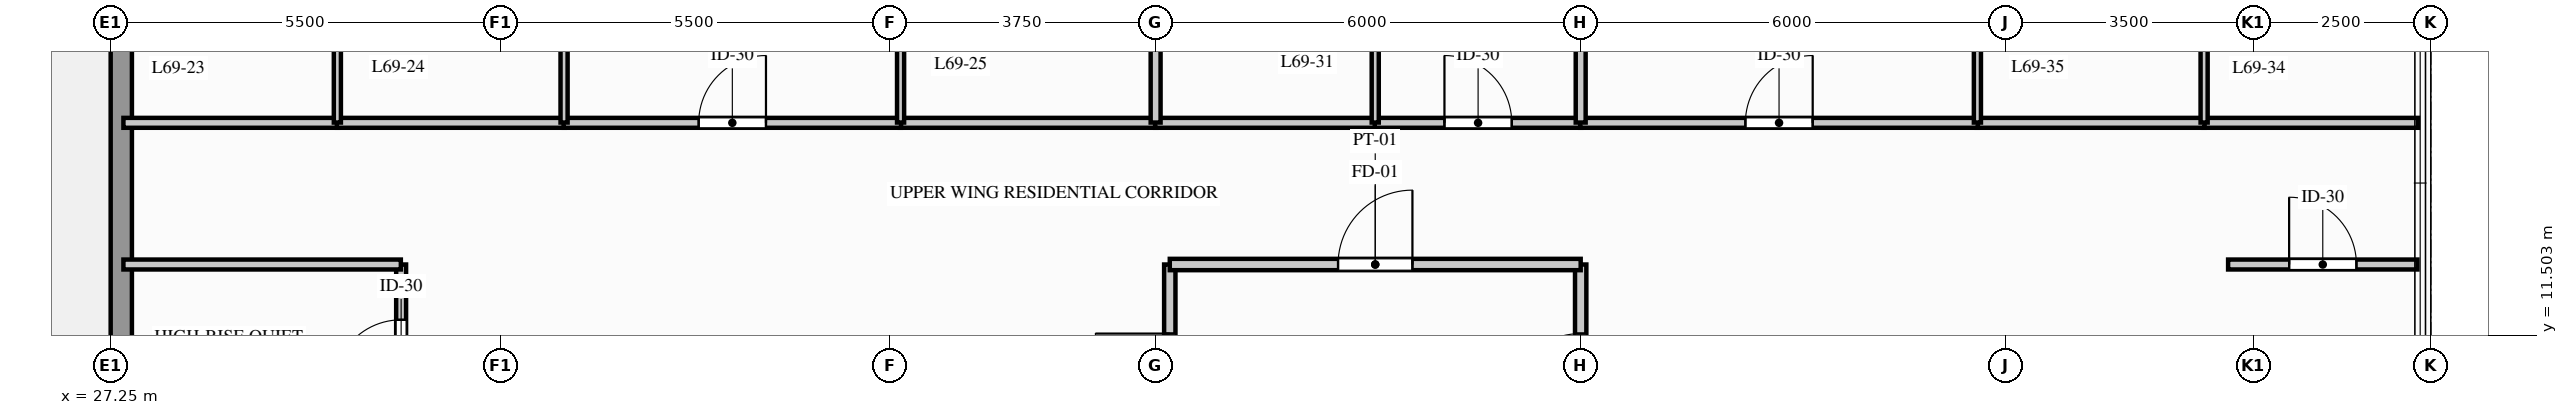
"""IFC4 building model, lengths in metres.
Left out: names, types, materials, properties, quantities, classifications, styles, units other than length and angle.
Written with IfcOpenShell. Run it as: python <this file> out.ifc"""

import sys

from ifc_helpers import new_model, si_unit, direction, frame, frame_2d, origin, place, context, subcontext, project, spatial, rectangle, extrude, element, fill, save


model = new_model("IFC4")
c1 = context("Model", 3, precision=1e-05, world=origin(), true_north=direction((0.0, 1.0)))
c2 = subcontext(c1, "Body", "Model", "MODEL_VIEW")
j1 = project(units=[si_unit("LENGTHUNIT", "METRE"), si_unit("PLANEANGLEUNIT", "RADIAN")], contexts=[c1])
p1 = place(None, origin())
s1 = spatial("IfcSite", under=j1, at=p1, CompositionType="ELEMENT")
p2 = place(p1, origin())
s2 = spatial("IfcBuilding", under=s1, at=p2, CompositionType="ELEMENT")
p3 = place(p2, frame((0.0, 0.0, 227.3)))
s3 = spatial("IfcBuildingStorey", under=s2, at=p3, CompositionType="ELEMENT", Elevation=227.3)
p4 = place(p3, frame((27.4, 24.0, 0.0), z_axis=(0.0, 0.0, 1.0), x_axis=(0.0, -1.0, 0.0)))
e1 = element("IfcWall", 1, at=p4, inside=s3, PredefinedType="STANDARD", context=c2, shape_type="SweptSolid", body=[
    extrude(rectangle(XDim=21.5, YDim=0.3, at=frame_2d((10.75, 0.0))), origin(), (0.0, 0.0, 1.0), 2.332),
])
p5 = place(p4, frame((5.5, 0.0, 0.0)))
e2 = element("IfcOpeningElement", 2, at=p5, cuts=e1, PredefinedType="OPENING", context=c2, shape_type="SweptSolid", body=[
    extrude(rectangle(XDim=1.1, YDim=2.2, at=frame_2d((0.55, 1.1))), frame((0.0, 0.16, 0.0), z_axis=(0.0, -1.0, 0.0), x_axis=(1.0, 0.0, 0.0)), (0.0, 0.0, 1.0), 0.32),
])
p6 = place(p4, frame((2.43, 0.0, 0.312)))
e3 = element("IfcOpeningElement", 3, at=p6, cuts=e1, PredefinedType="OPENING", context=c2, shape_type="SweptSolid", body=[
    extrude(rectangle(XDim=1.5, YDim=1.8, at=frame_2d((0.75, 0.9))), frame((0.0, 0.16, 0.0), z_axis=(0.0, -1.0, 0.0), x_axis=(1.0, 0.0, 0.0)), (0.0, 0.0, 1.0), 0.32),
])
p7 = place(p3, frame((31.35, 9.989, 0.0), z_axis=(0.0, 0.0, 1.0), x_axis=(0.0, 1.0, 0.0)))
e4 = element("IfcWall", 4, at=p7, inside=s3, PredefinedType="PARTITIONING", context=c2, shape_type="SweptSolid", body=[
    extrude(rectangle(XDim=2.511, YDim=0.14, at=frame_2d((1.256, 0.0))), origin(), (0.0, 0.0, 1.0), 2.325),
])
p8 = place(p7, frame((0.781, 0.0, 0.0)))
e5 = element("IfcOpeningElement", 5, at=p8, cuts=e4, PredefinedType="OPENING", context=c2, shape_type="SweptSolid", body=[
    extrude(rectangle(XDim=0.95, YDim=2.05, at=frame_2d((0.475, 1.025))), frame((0.0, 0.08, 0.0), z_axis=(0.0, -1.0, 0.0), x_axis=(1.0, 0.0, 0.0)), (0.0, 0.0, 1.0), 0.16),
])
p9 = place(p3, frame((42.2, 9.5, 0.0), z_axis=(0.0, 0.0, 1.0), x_axis=(0.0, 1.0, 0.0)))
e6 = element("IfcWall", 6, at=p9, inside=s3, PredefinedType="PARTITIONING", context=c2, shape_type="SweptSolid", body=[
    extrude(rectangle(XDim=3.0, YDim=0.16, at=frame_2d((1.5, 0.0))), origin(), (0.0, 0.0, 1.0), 2.325),
])
p10 = place(p9, frame((0.975, 0.0, 0.0)))
e7 = element("IfcOpeningElement", 7, at=p10, cuts=e6, PredefinedType="OPENING", context=c2, shape_type="SweptSolid", body=[
    extrude(rectangle(XDim=1.05, YDim=2.06, at=frame_2d((0.525, 1.03))), frame((0.0, 0.09, 0.0), z_axis=(0.0, -1.0, 0.0), x_axis=(1.0, 0.0, 0.0)), (0.0, 0.0, 1.0), 0.18),
])
p11 = place(p3, frame((48.0, 9.5, 0.0), z_axis=(0.0, 0.0, 1.0), x_axis=(0.0, 1.0, 0.0)))
e8 = element("IfcWall", 8, at=p11, inside=s3, PredefinedType="PARTITIONING", context=c2, shape_type="SweptSolid", body=[
    extrude(rectangle(XDim=3.0, YDim=0.16, at=frame_2d((1.5, 0.0))), origin(), (0.0, 0.0, 1.0), 2.325),
])
p12 = place(p11, frame((0.975, 0.0, 0.0)))
e9 = element("IfcOpeningElement", 9, at=p12, cuts=e8, PredefinedType="OPENING", context=c2, shape_type="SweptSolid", body=[
    extrude(rectangle(XDim=1.05, YDim=2.06, at=frame_2d((0.525, 1.03))), frame((0.0, 0.09, 0.0), z_axis=(0.0, -1.0, 0.0), x_axis=(1.0, 0.0, 0.0)), (0.0, 0.0, 1.0), 0.18),
])
p13 = place(p3, frame((42.2, 12.5, 0.0), z_axis=(0.0, 0.0, 1.0), x_axis=(1.0, 0.0, 0.0)))
e10 = element("IfcWall", 10, at=p13, inside=s3, PredefinedType="PARTITIONING", context=c2, shape_type="SweptSolid", body=[
    extrude(rectangle(XDim=5.8, YDim=0.16, at=frame_2d((2.9, 0.0))), origin(), (0.0, 0.0, 1.0), 2.325),
])
p14 = place(p13, frame((2.375, 0.0, 0.0)))
e11 = element("IfcOpeningElement", 11, at=p14, cuts=e10, PredefinedType="OPENING", context=c2, shape_type="SweptSolid", body=[
    extrude(rectangle(XDim=1.05, YDim=2.06, at=frame_2d((0.525, 1.03))), frame((0.0, 0.09, 0.0), z_axis=(0.0, -1.0, 0.0), x_axis=(1.0, 0.0, 0.0)), (0.0, 0.0, 1.0), 0.18),
])
p15 = place(p3, frame((57.139, 12.5, 0.0), z_axis=(0.0, 0.0, 1.0), x_axis=(1.0, 0.0, 0.0)))
e12 = element("IfcWall", 12, at=p15, inside=s3, PredefinedType="PARTITIONING", context=c2, shape_type="SweptSolid", body=[
    extrude(rectangle(XDim=2.673, YDim=0.14, at=frame_2d((1.336, 0.0))), origin(), (0.0, 0.0, 1.0), 2.89),
])
p16 = place(p15, frame((0.861, 0.0, 0.0)))
e13 = element("IfcOpeningElement", 13, at=p16, cuts=e12, PredefinedType="OPENING", context=c2, shape_type="SweptSolid", body=[
    extrude(rectangle(XDim=0.95, YDim=2.05, at=frame_2d((0.475, 1.025))), frame((0.0, 0.08, 0.0), z_axis=(0.0, -1.0, 0.0), x_axis=(1.0, 0.0, 0.0)), (0.0, 0.0, 1.0), 0.16),
])
p17 = place(p3, frame((27.43, 12.5, 0.0), z_axis=(0.0, 0.0, 1.0), x_axis=(1.0, 0.0, 0.0)))
e14 = element("IfcWall", 14, at=p17, inside=s3, PredefinedType="PARTITIONING", context=c2, shape_type="SweptSolid", body=[
    extrude(rectangle(XDim=3.916, YDim=0.14, at=frame_2d((1.958, 0.0))), origin(), (0.0, 0.0, 1.0), 2.89),
])
p18 = place(p3, frame((27.43, 14.5, 0.0), z_axis=(0.0, 0.0, 1.0), x_axis=(1.0, 0.0, 0.0)))
e15 = element("IfcWall", 15, at=p18, inside=s3, PredefinedType="PARTITIONING", context=c2, shape_type="SweptSolid", body=[
    extrude(rectangle(XDim=3.031, YDim=0.14, at=frame_2d((1.516, 0.0))), origin(), (0.0, 0.0, 1.0), 2.89),
])
p19 = place(p3, frame((30.443, 14.5, 0.0), z_axis=(0.0, 0.0, 1.0), x_axis=(1.0, 0.0, 0.0)))
e16 = element("IfcWall", 16, at=p19, inside=s3, PredefinedType="PARTITIONING", context=c2, shape_type="SweptSolid", body=[
    extrude(rectangle(XDim=3.219, YDim=0.14, at=frame_2d((1.609, 0.0))), origin(), (0.0, 0.0, 1.0), 2.89),
])
p20 = place(p3, frame((38.389, 14.5, 0.0), z_axis=(0.0, 0.0, 1.0), x_axis=(1.0, 0.0, 0.0)))
e17 = element("IfcWall", 17, at=p20, inside=s3, PredefinedType="PARTITIONING", context=c2, shape_type="SweptSolid", body=[
    extrude(rectangle(XDim=3.623, YDim=0.14, at=frame_2d((1.811, 0.0))), origin(), (0.0, 0.0, 1.0), 2.325),
])
p21 = place(p3, frame((33.643, 14.5, 0.0), z_axis=(0.0, 0.0, 1.0), x_axis=(1.0, 0.0, 0.0)))
e18 = element("IfcWall", 18, at=p21, inside=s3, PredefinedType="PARTITIONING", context=c2, shape_type="SweptSolid", body=[
    extrude(rectangle(XDim=4.765, YDim=0.14, at=frame_2d((2.382, 0.0))), origin(), (0.0, 0.0, 1.0), 2.325),
])
p22 = place(p21, frame((1.907, 0.0, 0.0)))
e19 = element("IfcOpeningElement", 19, at=p22, cuts=e18, PredefinedType="OPENING", context=c2, shape_type="SweptSolid", body=[
    extrude(rectangle(XDim=0.95, YDim=2.05, at=frame_2d((0.475, 1.025))), frame((0.0, 0.08, 0.0), z_axis=(0.0, -1.0, 0.0), x_axis=(1.0, 0.0, 0.0)), (0.0, 0.0, 1.0), 0.16),
])
p23 = place(p3, frame((41.993, 14.5, 0.0), z_axis=(0.0, 0.0, 1.0), x_axis=(1.0, 0.0, 0.0)))
e20 = element("IfcWall", 20, at=p23, inside=s3, PredefinedType="PARTITIONING", context=c2, shape_type="SweptSolid", body=[
    extrude(rectangle(XDim=3.119, YDim=0.14, at=frame_2d((1.559, 0.0))), origin(), (0.0, 0.0, 1.0), 2.325),
])
p24 = place(p3, frame((45.093, 14.5, 0.0), z_axis=(0.0, 0.0, 1.0), x_axis=(1.0, 0.0, 0.0)))
e21 = element("IfcWall", 21, at=p24, inside=s3, PredefinedType="PARTITIONING", context=c2, shape_type="SweptSolid", body=[
    extrude(rectangle(XDim=2.918, YDim=0.14, at=frame_2d((1.459, 0.0))), origin(), (0.0, 0.0, 1.0), 2.325),
])
p25 = place(p24, frame((0.984, 0.0, 0.0)))
e22 = element("IfcOpeningElement", 22, at=p25, cuts=e21, PredefinedType="OPENING", context=c2, shape_type="SweptSolid", body=[
    extrude(rectangle(XDim=0.95, YDim=2.05, at=frame_2d((0.475, 1.025))), frame((0.0, 0.08, 0.0), z_axis=(0.0, -1.0, 0.0), x_axis=(1.0, 0.0, 0.0)), (0.0, 0.0, 1.0), 0.16),
])
p26 = place(p3, frame((56.789, 14.5, 0.0), z_axis=(0.0, 0.0, 1.0), x_axis=(1.0, 0.0, 0.0)))
e23 = element("IfcWall", 23, at=p26, inside=s3, PredefinedType="PARTITIONING", context=c2, shape_type="SweptSolid", body=[
    extrude(rectangle(XDim=3.031, YDim=0.14, at=frame_2d((1.516, 0.0))), origin(), (0.0, 0.0, 1.0), 2.89),
])
p27 = place(p3, frame((53.589, 14.5, 0.0), z_axis=(0.0, 0.0, 1.0), x_axis=(1.0, 0.0, 0.0)))
e24 = element("IfcWall", 24, at=p27, inside=s3, PredefinedType="PARTITIONING", context=c2, shape_type="SweptSolid", body=[
    extrude(rectangle(XDim=3.219, YDim=0.14, at=frame_2d((1.609, 0.0))), origin(), (0.0, 0.0, 1.0), 2.325),
])
p28 = place(p3, frame((47.993, 14.5, 0.0), z_axis=(0.0, 0.0, 1.0), x_axis=(1.0, 0.0, 0.0)))
e25 = element("IfcWall", 25, at=p28, inside=s3, PredefinedType="PARTITIONING", context=c2, shape_type="SweptSolid", body=[
    extrude(rectangle(XDim=5.615, YDim=0.14, at=frame_2d((2.807, 0.0))), origin(), (0.0, 0.0, 1.0), 2.325),
])
p29 = place(p28, frame((2.332, 0.0, 0.0)))
e26 = element("IfcOpeningElement", 26, at=p29, cuts=e25, PredefinedType="OPENING", context=c2, shape_type="SweptSolid", body=[
    extrude(rectangle(XDim=0.95, YDim=2.05, at=frame_2d((0.475, 1.025))), frame((0.0, 0.08, 0.0), z_axis=(0.0, -1.0, 0.0), x_axis=(1.0, 0.0, 0.0)), (0.0, 0.0, 1.0), 0.16),
])
for number, where, z_axis, x_axis in (
    (27, (30.45, 14.504, 0.0), (0.0, 0.0, 1.0), (0.0, 1.0, 0.0)),
    (28, (33.65, 14.504, 0.0), (0.0, 0.0, 1.0), (0.0, 1.0, 0.0)),
    (29, (38.4, 14.504, 0.0), (0.0, 0.0, 1.0), (0.0, 1.0, 0.0)),
):
    element("IfcWall", number, at=place(p3, frame(where, z_axis=z_axis, x_axis=x_axis)), inside=s3, PredefinedType="PARTITIONING", context=c2, shape_type="SweptSolid", body=[
        extrude(rectangle(XDim=2.346, YDim=0.1, at=frame_2d((1.173, 0.0))), origin(), (0.0, 0.0, 1.0), 2.325),
    ])
p30 = place(p3, frame((42.0, 14.504, 0.0), z_axis=(0.0, 0.0, 1.0), x_axis=(0.0, 1.0, 0.0)))
e30 = element("IfcWall", 30, at=p30, inside=s3, PredefinedType="PARTITIONING", context=c2, shape_type="SweptSolid", body=[
    extrude(rectangle(XDim=2.346, YDim=0.14, at=frame_2d((1.173, 0.0))), origin(), (0.0, 0.0, 1.0), 2.325),
])
p31 = place(p3, frame((45.1, 14.504, 0.0), z_axis=(0.0, 0.0, 1.0), x_axis=(0.0, 1.0, 0.0)))
e31 = element("IfcWall", 31, at=p31, inside=s3, PredefinedType="PARTITIONING", context=c2, shape_type="SweptSolid", body=[
    extrude(rectangle(XDim=2.546, YDim=0.1, at=frame_2d((1.273, 0.0))), origin(), (0.0, 0.0, 1.0), 2.325),
])
p32 = place(p3, frame((48.0, 14.504, 0.0), z_axis=(0.0, 0.0, 1.0), x_axis=(0.0, 1.0, 0.0)))
e32 = element("IfcWall", 32, at=p32, inside=s3, PredefinedType="PARTITIONING", context=c2, shape_type="SweptSolid", body=[
    extrude(rectangle(XDim=7.253, YDim=0.14, at=frame_2d((3.627, 0.0))), origin(), (0.0, 0.0, 1.0), 2.325),
])
for number, where, z_axis, x_axis in (
    (33, (56.8, 14.504, 0.0), (0.0, 0.0, 1.0), (0.0, 1.0, 0.0)),
    (34, (53.6, 14.504, 0.0), (0.0, 0.0, 1.0), (0.0, 1.0, 0.0)),
):
    element("IfcWall", number, at=place(p3, frame(where, z_axis=z_axis, x_axis=x_axis)), inside=s3, PredefinedType="PARTITIONING", context=c2, shape_type="SweptSolid", body=[
        extrude(rectangle(XDim=2.346, YDim=0.1, at=frame_2d((1.173, 0.0))), origin(), (0.0, 0.0, 1.0), 2.325),
    ])
p33 = place(p8, origin())
e35 = element("IfcDoor", 35, at=p33, inside=s3, OperationType="SINGLE_SWING_LEFT", PredefinedType="DOOR", context=c2, shape_type="SweptSolid", body=[
    extrude(rectangle(XDim=0.95, YDim=2.05, at=frame_2d((0.475, 1.025))), frame((0.0, 0.025, 0.0), z_axis=(0.0, -1.0, 0.0), x_axis=(1.0, 0.0, 0.0)), (0.0, 0.0, 1.0), 0.05),
])
fill(e5, e35)
p34 = place(p10, origin())
e36 = element("IfcDoor", 36, at=p34, inside=s3, OperationType="SINGLE_SWING_RIGHT", PredefinedType="DOOR", context=c2, shape_type="SweptSolid", body=[
    extrude(rectangle(XDim=1.05, YDim=2.06, at=frame_2d((0.525, 1.03))), frame((0.0, 0.025, 0.0), z_axis=(0.0, -1.0, 0.0), x_axis=(1.0, 0.0, 0.0)), (0.0, 0.0, 1.0), 0.05),
])
fill(e7, e36)
p35 = place(p12, origin())
e37 = element("IfcDoor", 37, at=p35, inside=s3, OperationType="SINGLE_SWING_LEFT", PredefinedType="DOOR", context=c2, shape_type="SweptSolid", body=[
    extrude(rectangle(XDim=1.05, YDim=2.06, at=frame_2d((0.525, 1.03))), frame((0.0, 0.025, 0.0), z_axis=(0.0, -1.0, 0.0), x_axis=(1.0, 0.0, 0.0)), (0.0, 0.0, 1.0), 0.05),
])
fill(e9, e37)
p36 = place(p14, origin())
e38 = element("IfcDoor", 38, at=p36, inside=s3, OperationType="SINGLE_SWING_RIGHT", PredefinedType="DOOR", context=c2, shape_type="SweptSolid", body=[
    extrude(rectangle(XDim=1.05, YDim=2.06, at=frame_2d((0.525, 1.03))), frame((0.0, 0.025, 0.0), z_axis=(0.0, -1.0, 0.0), x_axis=(1.0, 0.0, 0.0)), (0.0, 0.0, 1.0), 0.05),
])
fill(e11, e38)
p37 = place(p16, origin())
e39 = element("IfcDoor", 39, at=p37, inside=s3, OperationType="SINGLE_SWING_LEFT", PredefinedType="DOOR", context=c2, shape_type="SweptSolid", body=[
    extrude(rectangle(XDim=0.95, YDim=2.05, at=frame_2d((0.475, 1.025))), frame((0.0, 0.025, 0.0), z_axis=(0.0, -1.0, 0.0), x_axis=(1.0, 0.0, 0.0)), (0.0, 0.0, 1.0), 0.05),
])
fill(e13, e39)
p38 = place(p22, origin())
e40 = element("IfcDoor", 40, at=p38, inside=s3, OperationType="SINGLE_SWING_RIGHT", PredefinedType="DOOR", context=c2, shape_type="SweptSolid", body=[
    extrude(rectangle(XDim=0.95, YDim=2.05, at=frame_2d((0.475, 1.025))), frame((0.0, 0.025, 0.0), z_axis=(0.0, -1.0, 0.0), x_axis=(1.0, 0.0, 0.0)), (0.0, 0.0, 1.0), 0.05),
])
fill(e19, e40)
p39 = place(p25, origin())
e41 = element("IfcDoor", 41, at=p39, inside=s3, OperationType="SINGLE_SWING_LEFT", PredefinedType="DOOR", context=c2, shape_type="SweptSolid", body=[
    extrude(rectangle(XDim=0.95, YDim=2.05, at=frame_2d((0.475, 1.025))), frame((0.0, 0.025, 0.0), z_axis=(0.0, -1.0, 0.0), x_axis=(1.0, 0.0, 0.0)), (0.0, 0.0, 1.0), 0.05),
])
fill(e22, e41)
p40 = place(p29, origin())
e42 = element("IfcDoor", 42, at=p40, inside=s3, OperationType="SINGLE_SWING_RIGHT", PredefinedType="DOOR", context=c2, shape_type="SweptSolid", body=[
    extrude(rectangle(XDim=0.95, YDim=2.05, at=frame_2d((0.475, 1.025))), frame((0.0, 0.025, 0.0), z_axis=(0.0, -1.0, 0.0), x_axis=(1.0, 0.0, 0.0)), (0.0, 0.0, 1.0), 0.05),
])
fill(e26, e42)
save(model, sys.argv[1])
